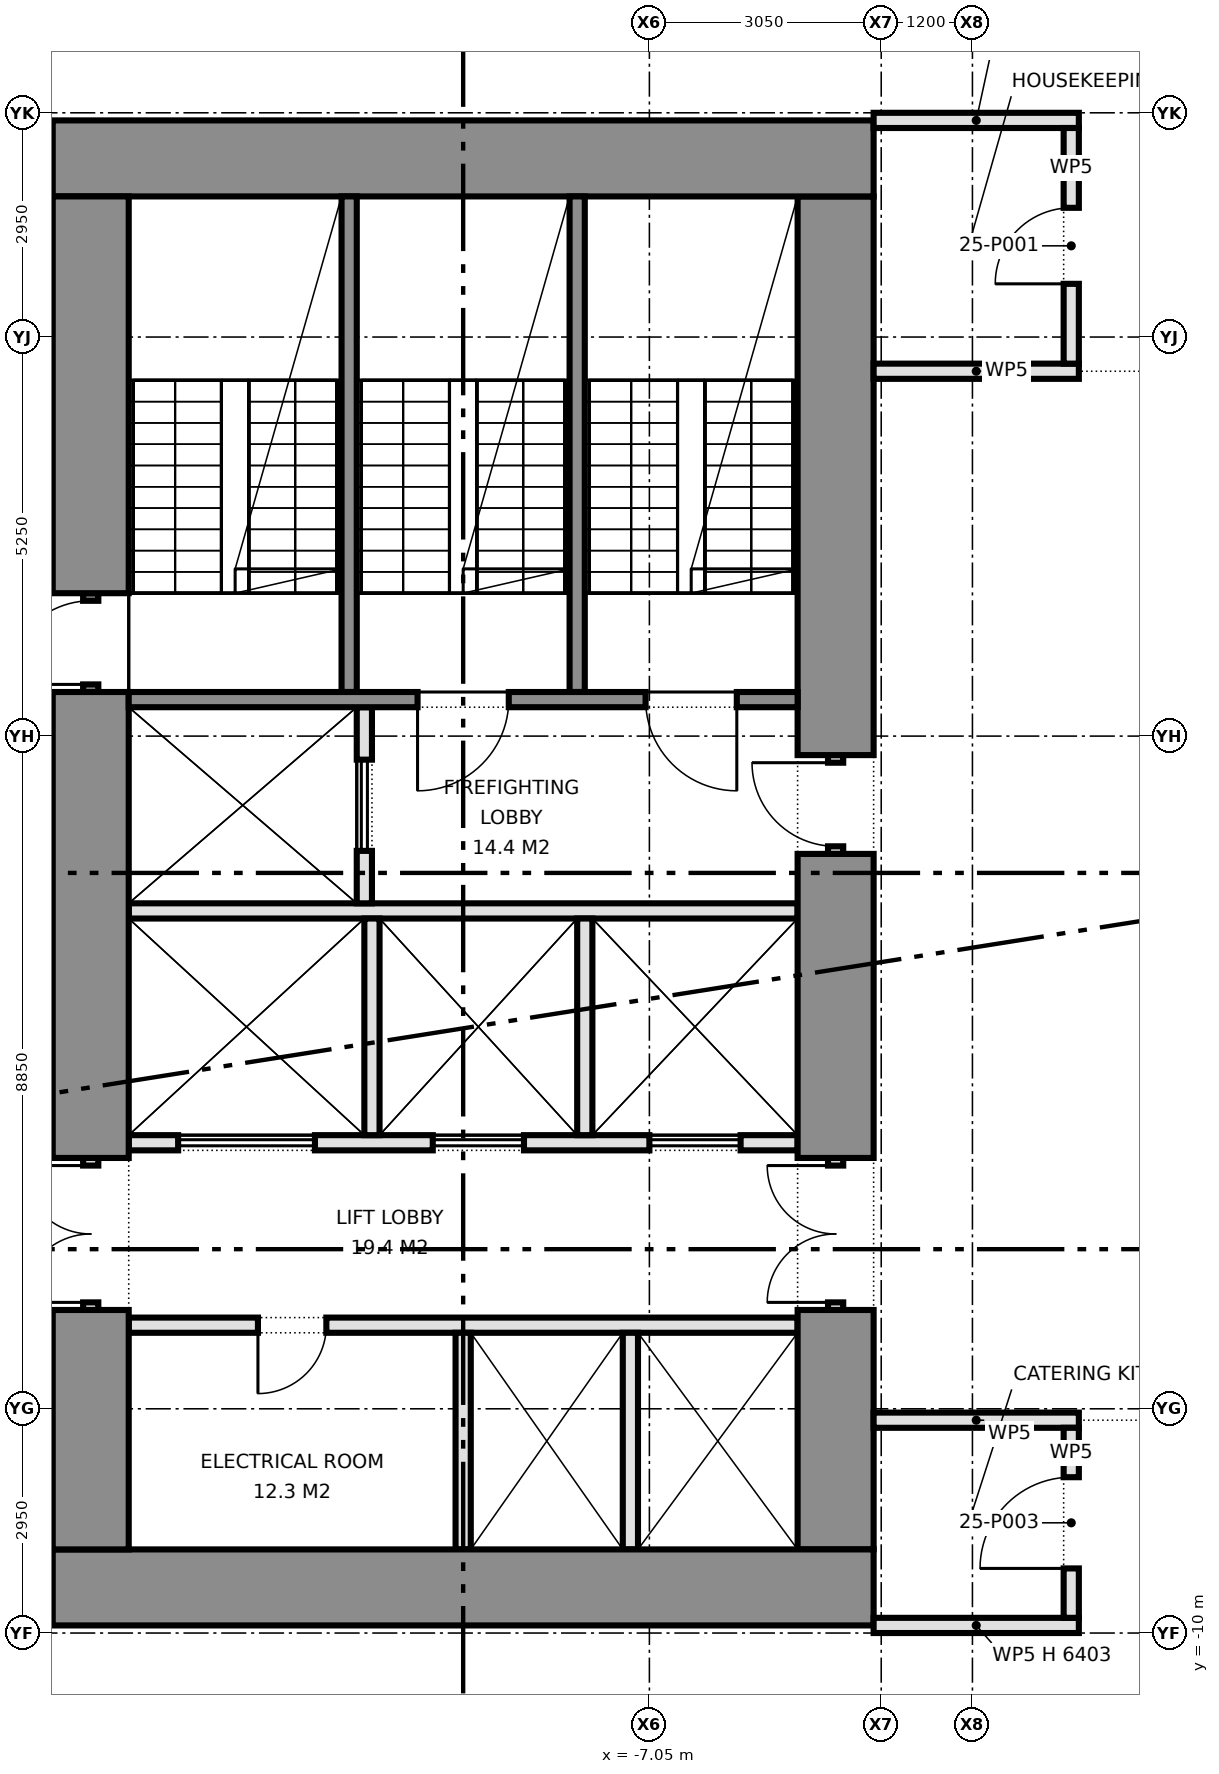
"""IFC4 building model, lengths in metres.
Left out: names, types, materials, properties, quantities, classifications, styles, units other than length and angle.
Written with IfcOpenShell. Run it as: python <this file> out.ifc"""

import sys

from ifc_helpers import new_model, si_unit, direction, frame, frame_2d, origin, place, context, subcontext, project, spatial, rectangle, extrude, element, fill, save


model = new_model("IFC4")
c1 = context("Model", 3, precision=1e-05, world=origin(), true_north=direction((0.0, 1.0)))
c2 = subcontext(c1, "Body", "Model", "MODEL_VIEW")
j1 = project(units=[si_unit("LENGTHUNIT", "METRE"), si_unit("PLANEANGLEUNIT", "RADIAN")], contexts=[c1])
p1 = place(None, origin())
s1 = spatial("IfcSite", under=j1, at=p1, CompositionType="ELEMENT")
p2 = place(p1, origin())
s2 = spatial("IfcBuilding", under=s1, at=p2, CompositionType="ELEMENT")
p3 = place(p2, frame((0.0, 0.0, 112.8)))
s3 = spatial("IfcBuildingStorey", under=s2, at=p3, CompositionType="ELEMENT", Elevation=112.8)
for number, where, z_axis, x_axis in (
    (1, (-14.9, -9.4, 0.0), (0.0, 0.0, 1.0), (1.0, 0.0, 0.0)),
    (2, (-14.9, 9.4, 0.0), (0.0, 0.0, 1.0), (1.0, 0.0, 0.0)),
):
    element("IfcWall", number, at=place(p3, frame(where, z_axis=z_axis, x_axis=x_axis)), inside=s3, PredefinedType="SHEAR", context=c2, shape_type="SweptSolid", body=[
        extrude(rectangle(XDim=10.8, YDim=1.0, at=frame_2d((5.4, 0.0))), origin(), (0.0, 0.0, 1.0), 7.35),
    ])
p4 = place(p3, frame((-14.4, -8.9, 0.0), z_axis=(0.0, 0.0, 1.0), x_axis=(0.0, 1.0, 0.0)))
e3 = element("IfcWall", 3, at=p4, inside=s3, PredefinedType="SHEAR", context=c2, shape_type="SweptSolid", body=[
    extrude(rectangle(XDim=3.15, YDim=1.0, at=frame_2d((1.575, 0.0))), origin(), (0.0, 0.0, 1.0), 7.35),
])
p5 = place(p3, frame((-14.4, -5.75, 0.0), z_axis=(0.0, 0.0, 1.0), x_axis=(0.0, 1.0, 0.0)))
e4 = element("IfcWall", 4, at=p5, inside=s3, PredefinedType="PARTITIONING", context=c2, shape_type="SweptSolid", body=[
    extrude(rectangle(XDim=2.0, YDim=0.2, at=frame_2d((1.0, 0.0))), origin(), (0.0, 0.0, 1.0), 2.4),
])
p6 = place(p5, frame((0.1, 0.0, 0.0)))
e5 = element("IfcOpeningElement", 5, at=p6, cuts=e4, PredefinedType="OPENING", context=c2, shape_type="SweptSolid", body=[
    extrude(rectangle(XDim=1.8, YDim=2.1, at=frame_2d((0.9, 1.05))), frame((0.0, 0.11, 0.0), z_axis=(0.0, -1.0, 0.0), x_axis=(1.0, 0.0, 0.0)), (0.0, 0.0, 1.0), 0.22),
])
p7 = place(p3, frame((-14.4, -3.75, 0.0), z_axis=(0.0, 0.0, 1.0), x_axis=(0.0, 1.0, 0.0)))
e6 = element("IfcWall", 6, at=p7, inside=s3, PredefinedType="SHEAR", context=c2, shape_type="SweptSolid", body=[
    extrude(rectangle(XDim=6.13, YDim=1.0, at=frame_2d((3.065, 0.0))), origin(), (0.0, 0.0, 1.0), 7.35),
])
p8 = place(p3, frame((-14.4, 2.38, 0.0), z_axis=(0.0, 0.0, 1.0), x_axis=(0.0, 1.0, 0.0)))
e7 = element("IfcWall", 7, at=p8, inside=s3, PredefinedType="SHEAR", context=c2, shape_type="SweptSolid", body=[
    extrude(rectangle(XDim=1.3, YDim=0.2, at=frame_2d((0.65, 0.0))), origin(), (0.0, 0.0, 1.0), 2.4),
])
p9 = place(p8, frame((0.1, 0.0, 0.0)))
e8 = element("IfcOpeningElement", 8, at=p9, cuts=e7, PredefinedType="OPENING", context=c2, shape_type="SweptSolid", body=[
    extrude(rectangle(XDim=1.1, YDim=2.1, at=frame_2d((0.55, 1.05))), frame((0.0, 0.11, 0.0), z_axis=(0.0, -1.0, 0.0), x_axis=(1.0, 0.0, 0.0)), (0.0, 0.0, 1.0), 0.22),
])
p10 = place(p3, frame((-14.4, 3.68, 0.0), z_axis=(0.0, 0.0, 1.0), x_axis=(0.0, 1.0, 0.0)))
e9 = element("IfcWall", 9, at=p10, inside=s3, PredefinedType="SHEAR", context=c2, shape_type="SweptSolid", body=[
    extrude(rectangle(XDim=5.22, YDim=1.0, at=frame_2d((2.61, 0.0))), origin(), (0.0, 0.0, 1.0), 7.35),
])
p11 = place(p3, frame((-4.6, -8.9, 0.0), z_axis=(0.0, 0.0, 1.0), x_axis=(0.0, 1.0, 0.0)))
e10 = element("IfcWall", 10, at=p11, inside=s3, PredefinedType="SHEAR", context=c2, shape_type="SweptSolid", body=[
    extrude(rectangle(XDim=3.15, YDim=1.0, at=frame_2d((1.575, 0.0))), origin(), (0.0, 0.0, 1.0), 7.35),
])
p12 = place(p3, frame((-4.6, -5.75, 0.0), z_axis=(0.0, 0.0, 1.0), x_axis=(0.0, 1.0, 0.0)))
e11 = element("IfcWall", 11, at=p12, inside=s3, PredefinedType="PARTITIONING", context=c2, shape_type="SweptSolid", body=[
    extrude(rectangle(XDim=2.0, YDim=0.2, at=frame_2d((1.0, 0.0))), origin(), (0.0, 0.0, 1.0), 2.4),
])
p13 = place(p12, frame((0.1, 0.0, 0.0)))
e12 = element("IfcOpeningElement", 12, at=p13, cuts=e11, PredefinedType="OPENING", context=c2, shape_type="SweptSolid", body=[
    extrude(rectangle(XDim=1.8, YDim=2.1, at=frame_2d((0.9, 1.05))), frame((0.0, 0.11, 0.0), z_axis=(0.0, -1.0, 0.0), x_axis=(1.0, 0.0, 0.0)), (0.0, 0.0, 1.0), 0.22),
])
p14 = place(p3, frame((-4.6, -3.75, 0.0), z_axis=(0.0, 0.0, 1.0), x_axis=(0.0, 1.0, 0.0)))
e13 = element("IfcWall", 13, at=p14, inside=s3, PredefinedType="SHEAR", context=c2, shape_type="SweptSolid", body=[
    extrude(rectangle(XDim=4.0, YDim=1.0, at=frame_2d((2.0, 0.0))), origin(), (0.0, 0.0, 1.0), 7.35),
])
p15 = place(p3, frame((-4.6, 0.25, 0.0), z_axis=(0.0, 0.0, 1.0), x_axis=(0.0, 1.0, 0.0)))
e14 = element("IfcWall", 14, at=p15, inside=s3, PredefinedType="PARTITIONING", context=c2, shape_type="SweptSolid", body=[
    extrude(rectangle(XDim=1.3, YDim=0.2, at=frame_2d((0.65, 0.0))), origin(), (0.0, 0.0, 1.0), 2.4),
])
p16 = place(p15, frame((0.1, 0.0, 0.0)))
e15 = element("IfcOpeningElement", 15, at=p16, cuts=e14, PredefinedType="OPENING", context=c2, shape_type="SweptSolid", body=[
    extrude(rectangle(XDim=1.1, YDim=2.1, at=frame_2d((0.55, 1.05))), frame((0.0, 0.11, 0.0), z_axis=(0.0, -1.0, 0.0), x_axis=(1.0, 0.0, 0.0)), (0.0, 0.0, 1.0), 0.22),
])
p17 = place(p3, frame((-4.6, 1.55, 0.0), z_axis=(0.0, 0.0, 1.0), x_axis=(0.0, 1.0, 0.0)))
e16 = element("IfcWall", 16, at=p17, inside=s3, PredefinedType="SHEAR", context=c2, shape_type="SweptSolid", body=[
    extrude(rectangle(XDim=7.35, YDim=1.0, at=frame_2d((3.675, 0.0))), origin(), (0.0, 0.0, 1.0), 7.35),
])
p18 = place(p3, frame((-13.9, -5.95, 0.0), z_axis=(0.0, 0.0, 1.0), x_axis=(1.0, 0.0, 0.0)))
e17 = element("IfcWall", 17, at=p18, inside=s3, PredefinedType="PARTITIONING", context=c2, shape_type="SweptSolid", body=[
    extrude(rectangle(XDim=8.8, YDim=0.2, at=frame_2d((4.4, 0.0))), origin(), (0.0, 0.0, 1.0), 7.35),
])
p19 = place(p18, frame((1.7, 0.0, 0.0)))
e18 = element("IfcOpeningElement", 18, at=p19, cuts=e17, PredefinedType="OPENING", context=c2, shape_type="SweptSolid", body=[
    extrude(rectangle(XDim=0.9, YDim=2.1, at=frame_2d((0.45, 1.05))), frame((0.0, 0.11, 0.0), z_axis=(0.0, -1.0, 0.0), x_axis=(1.0, 0.0, 0.0)), (0.0, 0.0, 1.0), 0.22),
])
p20 = place(p3, frame((-13.9, -3.55, 0.0), z_axis=(0.0, 0.0, 1.0), x_axis=(1.0, 0.0, 0.0)))
e19 = element("IfcWall", 19, at=p20, inside=s3, PredefinedType="PARTITIONING", context=c2, shape_type="SweptSolid", body=[
    extrude(rectangle(XDim=8.8, YDim=0.2, at=frame_2d((4.4, 0.0))), origin(), (0.0, 0.0, 1.0), 7.35),
])
p21 = place(p20, frame((0.65, 0.0, 0.0)))
e20 = element("IfcOpeningElement", 20, at=p21, cuts=e19, PredefinedType="OPENING", context=c2, shape_type="SweptSolid", body=[
    extrude(rectangle(XDim=1.8, YDim=2.1, at=frame_2d((0.9, 1.05))), frame((0.0, 0.11, 0.0), z_axis=(0.0, -1.0, 0.0), x_axis=(1.0, 0.0, 0.0)), (0.0, 0.0, 1.0), 0.22),
])
p22 = place(p20, frame((4.0, 0.0, 0.0)))
e21 = element("IfcOpeningElement", 21, at=p22, cuts=e19, PredefinedType="OPENING", context=c2, shape_type="SweptSolid", body=[
    extrude(rectangle(XDim=1.2, YDim=2.1, at=frame_2d((0.6, 1.05))), frame((0.0, 0.11, 0.0), z_axis=(0.0, -1.0, 0.0), x_axis=(1.0, 0.0, 0.0)), (0.0, 0.0, 1.0), 0.22),
])
p23 = place(p20, frame((6.85, 0.0, 0.0)))
e22 = element("IfcOpeningElement", 22, at=p23, cuts=e19, PredefinedType="OPENING", context=c2, shape_type="SweptSolid", body=[
    extrude(rectangle(XDim=1.2, YDim=2.1, at=frame_2d((0.6, 1.05))), frame((0.0, 0.11, 0.0), z_axis=(0.0, -1.0, 0.0), x_axis=(1.0, 0.0, 0.0)), (0.0, 0.0, 1.0), 0.22),
])
p24 = place(p3, frame((-13.9, -0.5, 0.0), z_axis=(0.0, 0.0, 1.0), x_axis=(1.0, 0.0, 0.0)))
e23 = element("IfcWall", 23, at=p24, inside=s3, PredefinedType="PARTITIONING", context=c2, shape_type="SweptSolid", body=[
    extrude(rectangle(XDim=8.8, YDim=0.2, at=frame_2d((4.4, 0.0))), origin(), (0.0, 0.0, 1.0), 7.35),
])
p25 = place(p3, frame((-10.8, -0.4, 0.0), z_axis=(0.0, 0.0, 1.0), x_axis=(0.0, 1.0, 0.0)))
e24 = element("IfcWall", 24, at=p25, inside=s3, PredefinedType="PARTITIONING", context=c2, shape_type="SweptSolid", body=[
    extrude(rectangle(XDim=2.58, YDim=0.2, at=frame_2d((1.29, 0.0))), origin(), (0.0, 0.0, 1.0), 7.35),
])
p26 = place(p25, frame((0.69, 0.0, 0.0)))
e25 = element("IfcOpeningElement", 25, at=p26, cuts=e24, PredefinedType="OPENING", context=c2, shape_type="SweptSolid", body=[
    extrude(rectangle(XDim=1.2, YDim=2.1, at=frame_2d((0.6, 1.05))), frame((0.0, 0.11, 0.0), z_axis=(0.0, -1.0, 0.0), x_axis=(1.0, 0.0, 0.0)), (0.0, 0.0, 1.0), 0.22),
])
p27 = place(p3, frame((-13.9, 2.28, 0.0), z_axis=(0.0, 0.0, 1.0), x_axis=(1.0, 0.0, 0.0)))
e26 = element("IfcWall", 26, at=p27, inside=s3, PredefinedType="SHEAR", context=c2, shape_type="SweptSolid", body=[
    extrude(rectangle(XDim=8.8, YDim=0.2, at=frame_2d((4.4, 0.0))), origin(), (0.0, 0.0, 1.0), 7.35),
])
p28 = place(p27, frame((3.8, 0.0, 0.0)))
e27 = element("IfcOpeningElement", 27, at=p28, cuts=e26, PredefinedType="OPENING", context=c2, shape_type="SweptSolid", body=[
    extrude(rectangle(XDim=1.2, YDim=2.1, at=frame_2d((0.6, 1.05))), frame((0.0, 0.11, 0.0), z_axis=(0.0, -1.0, 0.0), x_axis=(1.0, 0.0, 0.0)), (0.0, 0.0, 1.0), 0.22),
])
p29 = place(p27, frame((6.8, 0.0, 0.0)))
e28 = element("IfcOpeningElement", 28, at=p29, cuts=e26, PredefinedType="OPENING", context=c2, shape_type="SweptSolid", body=[
    extrude(rectangle(XDim=1.2, YDim=2.1, at=frame_2d((0.6, 1.05))), frame((0.0, 0.11, 0.0), z_axis=(0.0, -1.0, 0.0), x_axis=(1.0, 0.0, 0.0)), (0.0, 0.0, 1.0), 0.22),
])
for number, where, z_axis, x_axis in (
    (29, (-11.0, 2.38, 0.0), (0.0, 0.0, 1.0), (0.0, 1.0, 0.0)),
    (30, (-8.0, 2.38, 0.0), (0.0, 0.0, 1.0), (0.0, 1.0, 0.0)),
):
    element("IfcWall", number, at=place(p3, frame(where, z_axis=z_axis, x_axis=x_axis)), inside=s3, PredefinedType="SHEAR", context=c2, shape_type="SweptSolid", body=[
        extrude(rectangle(XDim=6.52, YDim=0.2, at=frame_2d((3.26, 0.0))), origin(), (0.0, 0.0, 1.0), 7.35),
    ])
for number, where, z_axis, x_axis in (
    (31, (-9.5, -8.9, 0.0), (0.0, 0.0, 1.0), (0.0, 1.0, 0.0)),
    (32, (-7.3, -8.9, 0.0), (0.0, 0.0, 1.0), (0.0, 1.0, 0.0)),
    (33, (-10.7, -3.45, 0.0), (0.0, 0.0, 1.0), (0.0, 1.0, 0.0)),
    (34, (-7.9, -3.45, 0.0), (0.0, 0.0, 1.0), (0.0, 1.0, 0.0)),
):
    element("IfcWall", number, at=place(p3, frame(where, z_axis=z_axis, x_axis=x_axis)), inside=s3, PredefinedType="PARTITIONING", context=c2, shape_type="SweptSolid", body=[
        extrude(rectangle(XDim=2.85, YDim=0.2, at=frame_2d((1.425, 0.0))), origin(), (0.0, 0.0, 1.0), 7.35),
    ])
p30 = place(p3, frame((-4.1, -9.9, 0.0), z_axis=(0.0, 0.0, 1.0), x_axis=(1.0, 0.0, 0.0)))
e35 = element("IfcWall", 35, at=p30, inside=s3, PredefinedType="PARTITIONING", context=c2, shape_type="SweptSolid", body=[
    extrude(rectangle(XDim=2.7, YDim=0.2, at=frame_2d((1.35, 0.0))), origin(), (0.0, 0.0, 1.0), 6.403),
])
for number, where, z_axis, x_axis in (
    (36, (-4.1, -7.2, 0.0), (0.0, 0.0, 1.0), (1.0, 0.0, 0.0)),
    (37, (-4.1, 6.6, 0.0), (0.0, 0.0, 1.0), (1.0, 0.0, 0.0)),
):
    element("IfcWall", number, at=place(p3, frame(where, z_axis=z_axis, x_axis=x_axis)), inside=s3, PredefinedType="PARTITIONING", context=c2, shape_type="SweptSolid", body=[
        extrude(rectangle(XDim=2.7, YDim=0.2, at=frame_2d((1.35, 0.0))), origin(), (0.0, 0.0, 1.0), 7.35),
    ])
p31 = place(p3, frame((-4.1, 9.9, 0.0), z_axis=(0.0, 0.0, 1.0), x_axis=(1.0, 0.0, 0.0)))
e38 = element("IfcWall", 38, at=p31, inside=s3, PredefinedType="PARTITIONING", context=c2, shape_type="SweptSolid", body=[
    extrude(rectangle(XDim=2.7, YDim=0.2, at=frame_2d((1.35, 0.0))), origin(), (0.0, 0.0, 1.0), 6.403),
])
p32 = place(p3, frame((-1.5, -9.8, 0.0), z_axis=(0.0, 0.0, 1.0), x_axis=(0.0, 1.0, 0.0)))
e39 = element("IfcWall", 39, at=p32, inside=s3, PredefinedType="PARTITIONING", context=c2, shape_type="SweptSolid", body=[
    extrude(rectangle(XDim=2.5, YDim=0.2, at=frame_2d((1.25, 0.0))), origin(), (0.0, 0.0, 1.0), 7.35),
])
p33 = place(p32, frame((0.65, 0.0, 0.0)))
e40 = element("IfcOpeningElement", 40, at=p33, cuts=e39, PredefinedType="OPENING", context=c2, shape_type="SweptSolid", body=[
    extrude(rectangle(XDim=1.2, YDim=2.1, at=frame_2d((0.6, 1.05))), frame((0.0, 0.11, 0.0), z_axis=(0.0, -1.0, 0.0), x_axis=(1.0, 0.0, 0.0)), (0.0, 0.0, 1.0), 0.22),
])
p34 = place(p3, frame((-1.5, 6.7, 0.0), z_axis=(0.0, 0.0, 1.0), x_axis=(0.0, 1.0, 0.0)))
e41 = element("IfcWall", 41, at=p34, inside=s3, PredefinedType="PARTITIONING", context=c2, shape_type="SweptSolid", body=[
    extrude(rectangle(XDim=3.1, YDim=0.2, at=frame_2d((1.55, 0.0))), origin(), (0.0, 0.0, 1.0), 7.35),
])
p35 = place(p34, frame((1.05, 0.0, 0.0)))
e42 = element("IfcOpeningElement", 42, at=p35, cuts=e41, PredefinedType="OPENING", context=c2, shape_type="SweptSolid", body=[
    extrude(rectangle(XDim=1.0, YDim=2.1, at=frame_2d((0.5, 1.05))), frame((0.0, 0.11, 0.0), z_axis=(0.0, -1.0, 0.0), x_axis=(1.0, 0.0, 0.0)), (0.0, 0.0, 1.0), 0.22),
])
p36 = place(p6, origin())
e43 = element("IfcDoor", 43, at=p36, inside=s3, OperationType="DOUBLE_DOOR_SINGLE_SWING", PredefinedType="DOOR", context=c2, shape_type="SweptSolid", body=[
    extrude(rectangle(XDim=1.8, YDim=2.1, at=frame_2d((0.9, 1.05))), frame((0.0, 0.025, 0.0), z_axis=(0.0, -1.0, 0.0), x_axis=(1.0, 0.0, 0.0)), (0.0, 0.0, 1.0), 0.05),
])
fill(e5, e43)
p37 = place(p9, origin())
e44 = element("IfcDoor", 44, at=p37, inside=s3, OperationType="SINGLE_SWING_LEFT", PredefinedType="DOOR", context=c2, shape_type="SweptSolid", body=[
    extrude(rectangle(XDim=1.1, YDim=2.1, at=frame_2d((0.55, 1.05))), frame((0.0, 0.025, 0.0), z_axis=(0.0, -1.0, 0.0), x_axis=(1.0, 0.0, 0.0)), (0.0, 0.0, 1.0), 0.05),
])
fill(e8, e44)
p38 = place(p13, origin())
e45 = element("IfcDoor", 45, at=p38, inside=s3, OperationType="DOUBLE_DOOR_SINGLE_SWING", PredefinedType="DOOR", context=c2, shape_type="SweptSolid", body=[
    extrude(rectangle(XDim=1.8, YDim=2.1, at=frame_2d((0.9, 1.05))), frame((0.0, 0.025, 0.0), z_axis=(0.0, -1.0, 0.0), x_axis=(1.0, 0.0, 0.0)), (0.0, 0.0, 1.0), 0.05),
])
fill(e12, e45)
p39 = place(p16, origin())
e46 = element("IfcDoor", 46, at=p39, inside=s3, OperationType="SINGLE_SWING_RIGHT", PredefinedType="DOOR", context=c2, shape_type="SweptSolid", body=[
    extrude(rectangle(XDim=1.1, YDim=2.1, at=frame_2d((0.55, 1.05))), frame((0.0, 0.025, 0.0), z_axis=(0.0, -1.0, 0.0), x_axis=(1.0, 0.0, 0.0)), (0.0, 0.0, 1.0), 0.05),
])
fill(e15, e46)
p40 = place(p21, origin())
e47 = element("IfcDoor", 47, at=p40, inside=s3, OperationType="DOUBLE_DOOR_SLIDING", PredefinedType="DOOR", context=c2, shape_type="SweptSolid", body=[
    extrude(rectangle(XDim=1.8, YDim=2.1, at=frame_2d((0.9, 1.05))), frame((0.0, 0.025, 0.0), z_axis=(0.0, -1.0, 0.0), x_axis=(1.0, 0.0, 0.0)), (0.0, 0.0, 1.0), 0.05),
])
fill(e20, e47)
p41 = place(p22, origin())
e48 = element("IfcDoor", 48, at=p41, inside=s3, OperationType="DOUBLE_DOOR_SLIDING", PredefinedType="DOOR", context=c2, shape_type="SweptSolid", body=[
    extrude(rectangle(XDim=1.2, YDim=2.1, at=frame_2d((0.6, 1.05))), frame((0.0, 0.025, 0.0), z_axis=(0.0, -1.0, 0.0), x_axis=(1.0, 0.0, 0.0)), (0.0, 0.0, 1.0), 0.05),
])
fill(e21, e48)
p42 = place(p23, origin())
e49 = element("IfcDoor", 49, at=p42, inside=s3, OperationType="DOUBLE_DOOR_SLIDING", PredefinedType="DOOR", context=c2, shape_type="SweptSolid", body=[
    extrude(rectangle(XDim=1.2, YDim=2.1, at=frame_2d((0.6, 1.05))), frame((0.0, 0.025, 0.0), z_axis=(0.0, -1.0, 0.0), x_axis=(1.0, 0.0, 0.0)), (0.0, 0.0, 1.0), 0.05),
])
fill(e22, e49)
p43 = place(p26, origin())
e50 = element("IfcDoor", 50, at=p43, inside=s3, OperationType="DOUBLE_DOOR_SLIDING", PredefinedType="DOOR", context=c2, shape_type="SweptSolid", body=[
    extrude(rectangle(XDim=1.2, YDim=2.1, at=frame_2d((0.6, 1.05))), frame((0.0, 0.025, 0.0), z_axis=(0.0, -1.0, 0.0), x_axis=(1.0, 0.0, 0.0)), (0.0, 0.0, 1.0), 0.05),
])
fill(e25, e50)
p44 = place(p19, frame((0.9, 0.0, 0.0), z_axis=(0.0, 0.0, 1.0), x_axis=(-1.0, 0.0, 0.0)))
e51 = element("IfcDoor", 51, at=p44, inside=s3, OperationType="SINGLE_SWING_RIGHT", PredefinedType="DOOR", context=c2, shape_type="SweptSolid", body=[
    extrude(rectangle(XDim=0.9, YDim=2.1, at=frame_2d((0.45, 1.05))), frame((0.0, 0.025, 0.0), z_axis=(0.0, -1.0, 0.0), x_axis=(1.0, 0.0, 0.0)), (0.0, 0.0, 1.0), 0.05),
])
fill(e18, e51)
p45 = place(p28, frame((1.2, 0.0, 0.0), z_axis=(0.0, 0.0, 1.0), x_axis=(-1.0, 0.0, 0.0)))
e52 = element("IfcDoor", 52, at=p45, inside=s3, OperationType="SINGLE_SWING_RIGHT", PredefinedType="DOOR", context=c2, shape_type="SweptSolid", body=[
    extrude(rectangle(XDim=1.2, YDim=2.1, at=frame_2d((0.6, 1.05))), frame((0.0, 0.025, 0.0), z_axis=(0.0, -1.0, 0.0), x_axis=(1.0, 0.0, 0.0)), (0.0, 0.0, 1.0), 0.05),
])
fill(e27, e52)
p46 = place(p29, frame((1.2, 0.0, 0.0), z_axis=(0.0, 0.0, 1.0), x_axis=(-1.0, 0.0, 0.0)))
e53 = element("IfcDoor", 53, at=p46, inside=s3, OperationType="SINGLE_SWING_LEFT", PredefinedType="DOOR", context=c2, shape_type="SweptSolid", body=[
    extrude(rectangle(XDim=1.2, YDim=2.1, at=frame_2d((0.6, 1.05))), frame((0.0, 0.025, 0.0), z_axis=(0.0, -1.0, 0.0), x_axis=(1.0, 0.0, 0.0)), (0.0, 0.0, 1.0), 0.05),
])
fill(e28, e53)
p47 = place(p35, origin())
e54 = element("IfcDoor", 54, at=p47, inside=s3, OperationType="SINGLE_SWING_LEFT", PredefinedType="DOOR", context=c2, shape_type="SweptSolid", body=[
    extrude(rectangle(XDim=1.0, YDim=2.1, at=frame_2d((0.5, 1.05))), frame((0.0, 0.025, 0.0), z_axis=(0.0, -1.0, 0.0), x_axis=(1.0, 0.0, 0.0)), (0.0, 0.0, 1.0), 0.05),
])
fill(e42, e54)
p48 = place(p33, origin())
e55 = element("IfcDoor", 55, at=p48, inside=s3, OperationType="SINGLE_SWING_LEFT", PredefinedType="DOOR", context=c2, shape_type="SweptSolid", body=[
    extrude(rectangle(XDim=1.2, YDim=2.1, at=frame_2d((0.6, 1.05))), frame((0.0, 0.025, 0.0), z_axis=(0.0, -1.0, 0.0), x_axis=(1.0, 0.0, 0.0)), (0.0, 0.0, 1.0), 0.05),
])
fill(e40, e55)
save(model, sys.argv[1])
